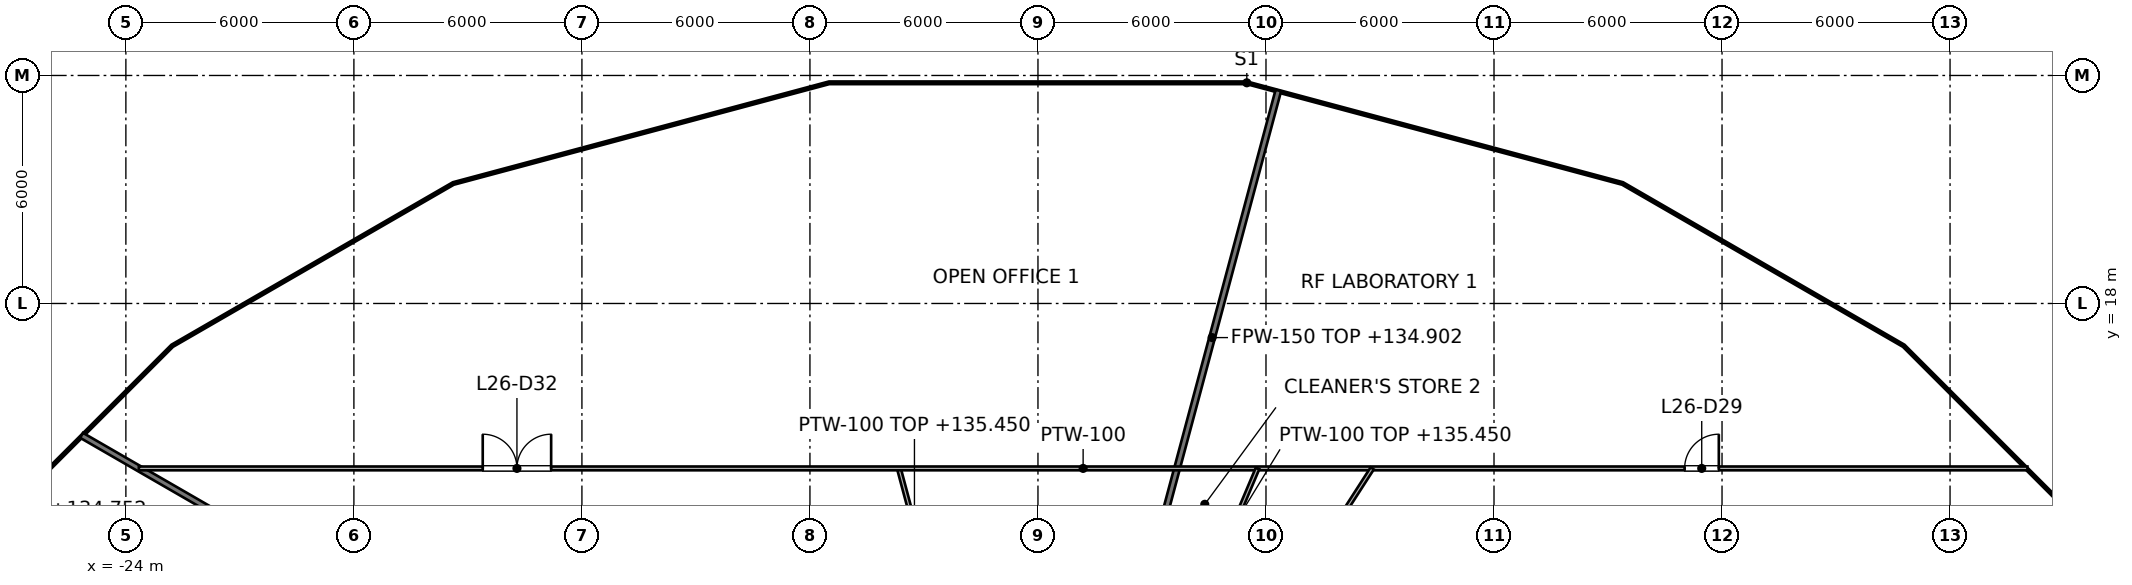
"""IFC4 building model, lengths in metres.
Left out: names, types, materials, properties, quantities, classifications, styles, units other than length and angle.
Written with IfcOpenShell. Run it as: python <this file> out.ifc"""

import sys

from ifc_helpers import new_model, si_unit, direction, frame, frame_2d, origin, place, context, subcontext, project, spatial, rectangle, extrude, element, fill, save


model = new_model("IFC4")
c1 = context("Model", 3, precision=1e-05, world=origin(), true_north=direction((0.0, 1.0)))
c2 = subcontext(c1, "Body", "Model", "MODEL_VIEW")
j1 = project(units=[si_unit("LENGTHUNIT", "METRE"), si_unit("PLANEANGLEUNIT", "RADIAN")], contexts=[c1])
p1 = place(None, origin())
s1 = spatial("IfcSite", under=j1, at=p1, CompositionType="ELEMENT")
p2 = place(p1, origin())
s2 = spatial("IfcBuilding", under=s1, at=p2, CompositionType="ELEMENT")
p3 = place(p2, frame((0.0, 0.0, 131.4)))
s3 = spatial("IfcBuildingStorey", under=s2, at=p3, CompositionType="ELEMENT", Elevation=131.4)
p4 = place(p3, frame((-25.166, 14.53, 0.0), z_axis=(0.0, 0.0, 1.0), x_axis=(0.866034552186, -0.499984154169, 0.0)))
e1 = element("IfcWall", 1, at=p4, inside=s3, PredefinedType="PARTITIONING", context=c2, shape_type="SweptSolid", body=[
    extrude(rectangle(XDim=7.86, YDim=0.15, at=frame_2d((3.93, 0.0))), origin(), (0.0, 0.0, 1.0), 3.352),
])
p5 = place(p3, frame((2.84, 10.6, 0.0), z_axis=(0.0, 0.0, 1.0), x_axis=(0.258833974298, 0.9659218259, 0.0)))
e2 = element("IfcWall", 2, at=p5, inside=s3, PredefinedType="PARTITIONING", context=c2, shape_type="SweptSolid", body=[
    extrude(rectangle(XDim=13.464, YDim=0.15, at=frame_2d((6.732, 0.0))), origin(), (0.0, 0.0, 1.0), 3.502),
])
p6 = place(p3, frame((-3.66, 13.66, 0.0), z_axis=(0.0, 0.0, 1.0), x_axis=(0.258804143637, -0.965929819001, 0.0)))
e3 = element("IfcWall", 3, at=p6, inside=s3, PredefinedType="PARTITIONING", context=c2, shape_type="SweptSolid", body=[
    extrude(rectangle(XDim=3.168, YDim=0.1, at=frame_2d((1.584, 0.0))), origin(), (0.0, 0.0, 1.0), 4.05),
])
p7 = place(p3, frame((-23.659, 13.66, 0.0), z_axis=(0.0, 0.0, 1.0), x_axis=(1.0, 0.0, 0.0)))
e4 = element("IfcWall", 4, at=p7, inside=s3, PredefinedType="PARTITIONING", context=c2, shape_type="SweptSolid", body=[
    extrude(rectangle(XDim=49.695, YDim=0.1, at=frame_2d((24.847, 0.0))), origin(), (0.0, 0.0, 1.0), 3.127),
])
p8 = place(p7, frame((40.675, 0.0, 0.0)))
e5 = element("IfcOpeningElement", 5, at=p8, cuts=e4, PredefinedType="OPENING", context=c2, shape_type="SweptSolid", body=[
    extrude(rectangle(XDim=0.9, YDim=2.1, at=frame_2d((0.45, 1.05))), frame((0.0, 0.05, 0.0), z_axis=(0.0, -1.0, 0.0), x_axis=(1.0, 0.0, 0.0)), (0.0, 0.0, 1.0), 0.1),
])
p9 = place(p7, frame((9.049, 0.0, 0.0)))
e6 = element("IfcOpeningElement", 6, at=p9, cuts=e4, PredefinedType="OPENING", context=c2, shape_type="SweptSolid", body=[
    extrude(rectangle(XDim=1.8, YDim=2.1, at=frame_2d((0.9, 1.05))), frame((0.0, 0.05, 0.0), z_axis=(0.0, -1.0, 0.0), x_axis=(1.0, 0.0, 0.0)), (0.0, 0.0, 1.0), 0.1),
])
p10 = place(p3, frame((6.825, 10.6, 0.0), z_axis=(0.0, 0.0, 1.0), x_axis=(0.541330496355, 0.840809903436, 0.0)))
e7 = element("IfcWall", 7, at=p10, inside=s3, PredefinedType="PARTITIONING", context=c2, shape_type="SweptSolid", body=[
    extrude(rectangle(XDim=3.639, YDim=0.1, at=frame_2d((1.82, 0.0))), origin(), (0.0, 0.0, 1.0), 4.05),
])
p11 = place(p3, frame((4.484, 10.6, 0.0), z_axis=(0.0, 0.0, 1.0), x_axis=(0.389551289035, 0.921004773718, 0.0)))
e8 = element("IfcWall", 8, at=p11, inside=s3, PredefinedType="PARTITIONING", context=c2, shape_type="SweptSolid", body=[
    extrude(rectangle(XDim=3.322, YDim=0.1, at=frame_2d((1.661, 0.0))), origin(), (0.0, 0.0, 1.0), 4.05),
])
p12 = place(p8, origin())
e9 = element("IfcDoor", 9, at=p12, inside=s3, OperationType="SINGLE_SWING_RIGHT", PredefinedType="DOOR", context=c2, shape_type="SweptSolid", body=[
    extrude(rectangle(XDim=0.9, YDim=2.1, at=frame_2d((0.45, 1.05))), frame((0.0, 0.025, 0.0), z_axis=(0.0, -1.0, 0.0), x_axis=(1.0, 0.0, 0.0)), (0.0, 0.0, 1.0), 0.05),
])
fill(e5, e9)
p13 = place(p9, origin())
e10 = element("IfcDoor", 10, at=p13, inside=s3, OperationType="DOUBLE_DOOR_SINGLE_SWING", PredefinedType="DOOR", context=c2, shape_type="SweptSolid", body=[
    extrude(rectangle(XDim=1.8, YDim=2.1, at=frame_2d((0.9, 1.05))), frame((0.0, 0.025, 0.0), z_axis=(0.0, -1.0, 0.0), x_axis=(1.0, 0.0, 0.0)), (0.0, 0.0, 1.0), 0.05),
])
fill(e6, e10)
save(model, sys.argv[1])
